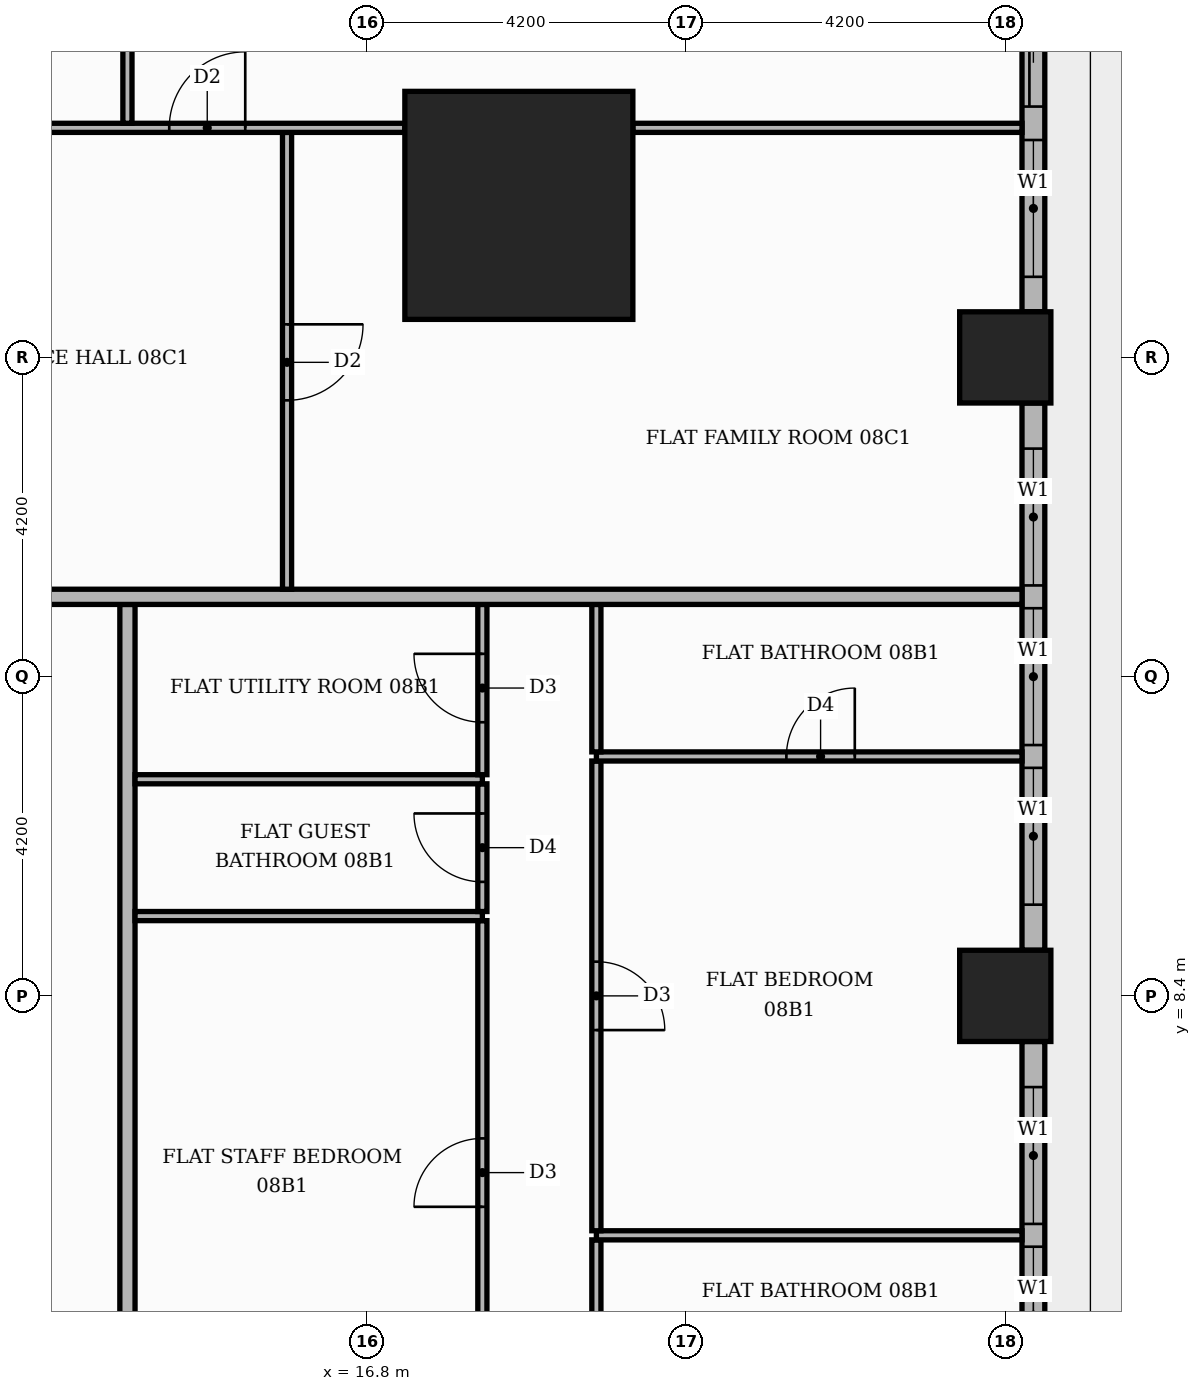
"""IFC4 building model, lengths in metres.
Left out: names, types, materials, properties, quantities, classifications, styles, units other than length and angle.
Written with IfcOpenShell. Run it as: python <this file> out.ifc"""

import sys

from ifc_helpers import new_model, si_unit, direction, frame, frame_2d, origin, origin_2d, place, context, subcontext, project, spatial, rectangle, extrude, element, fill, save


model = new_model("IFC4")
c1 = context("Model", 3, precision=1e-05, world=origin(), true_north=direction((0.0, 1.0)))
c2 = subcontext(c1, "Body", "Model", "MODEL_VIEW")
j1 = project(units=[si_unit("LENGTHUNIT", "METRE"), si_unit("PLANEANGLEUNIT", "RADIAN")], contexts=[c1])
p1 = place(None, origin())
s1 = spatial("IfcSite", under=j1, at=p1, CompositionType="ELEMENT")
p2 = place(p1, origin())
s2 = spatial("IfcBuilding", under=s1, at=p2, CompositionType="ELEMENT")
p3 = place(p2, frame((0.0, 0.0, 38.7)))
s3 = spatial("IfcBuildingStorey", under=s2, at=p3, CompositionType="ELEMENT", Elevation=38.7)
p4 = place(p3, frame((18.8, 18.8, 0.0), z_axis=(0.0, 0.0, 1.0), x_axis=(1.0, 0.0, 0.0)))
e1 = element("IfcColumn", 1, at=p4, inside=s3, PredefinedType="COLUMN", context=c2, shape_type="SweptSolid", body=[
    extrude(rectangle(XDim=3.0, YDim=3.0, at=origin_2d()), origin(), (0.0, 0.0, 1.0), 3.9),
])
for number, where, z_axis, x_axis in (
    (2, (25.2, 8.4, 0.0), (0.0, 0.0, 1.0), (1.0, 0.0, 0.0)),
    (3, (25.2, 16.8, 0.0), (0.0, 0.0, 1.0), (1.0, 0.0, 0.0)),
):
    element("IfcColumn", number, at=place(p3, frame(where, z_axis=z_axis, x_axis=x_axis)), inside=s3, PredefinedType="COLUMN", context=c2, shape_type="SweptSolid", body=[
        extrude(rectangle(XDim=1.2, YDim=1.2, at=origin_2d()), origin(), (0.0, 0.0, 1.0), 3.9),
    ])
p5 = place(p3, frame((25.57, 0.6, 0.0), z_axis=(0.0, 0.0, 1.0), x_axis=(0.0, 1.0, 0.0)))
e4 = element("IfcWall", 4, at=p5, inside=s3, PredefinedType="STANDARD", context=c2, shape_type="SweptSolid", body=[
    extrude(rectangle(XDim=7.2, YDim=0.3, at=frame_2d((3.6, 0.0))), origin(), (0.0, 0.0, 1.0), 3.48),
])
p6 = place(p5, frame((0.6, 0.0, 0.9)))
e5 = element("IfcOpeningElement", 5, at=p6, cuts=e4, PredefinedType="OPENING", context=c2, shape_type="SweptSolid", body=[
    extrude(rectangle(XDim=1.8, YDim=2.1, at=frame_2d((0.9, 1.05))), frame((0.0, 0.16, 0.0), z_axis=(0.0, -1.0, 0.0), x_axis=(1.0, 0.0, 0.0)), (0.0, 0.0, 1.0), 0.32),
])
p7 = place(p5, frame((2.7, 0.0, 0.9)))
e6 = element("IfcOpeningElement", 6, at=p7, cuts=e4, PredefinedType="OPENING", context=c2, shape_type="SweptSolid", body=[
    extrude(rectangle(XDim=1.8, YDim=2.1, at=frame_2d((0.9, 1.05))), frame((0.0, 0.16, 0.0), z_axis=(0.0, -1.0, 0.0), x_axis=(1.0, 0.0, 0.0)), (0.0, 0.0, 1.0), 0.32),
])
p8 = place(p5, frame((4.8, 0.0, 0.9)))
e7 = element("IfcOpeningElement", 7, at=p8, cuts=e4, PredefinedType="OPENING", context=c2, shape_type="SweptSolid", body=[
    extrude(rectangle(XDim=1.8, YDim=2.1, at=frame_2d((0.9, 1.05))), frame((0.0, 0.16, 0.0), z_axis=(0.0, -1.0, 0.0), x_axis=(1.0, 0.0, 0.0)), (0.0, 0.0, 1.0), 0.32),
])
p9 = place(p3, frame((25.57, 9.0, 0.0), z_axis=(0.0, 0.0, 1.0), x_axis=(0.0, 1.0, 0.0)))
e8 = element("IfcWall", 8, at=p9, inside=s3, PredefinedType="STANDARD", context=c2, shape_type="SweptSolid", body=[
    extrude(rectangle(XDim=7.2, YDim=0.3, at=frame_2d((3.6, 0.0))), origin(), (0.0, 0.0, 1.0), 3.48),
])
p10 = place(p9, frame((0.6, 0.0, 0.9)))
e9 = element("IfcOpeningElement", 9, at=p10, cuts=e8, PredefinedType="OPENING", context=c2, shape_type="SweptSolid", body=[
    extrude(rectangle(XDim=1.8, YDim=2.1, at=frame_2d((0.9, 1.05))), frame((0.0, 0.16, 0.0), z_axis=(0.0, -1.0, 0.0), x_axis=(1.0, 0.0, 0.0)), (0.0, 0.0, 1.0), 0.32),
])
p11 = place(p9, frame((2.7, 0.0, 0.9)))
e10 = element("IfcOpeningElement", 10, at=p11, cuts=e8, PredefinedType="OPENING", context=c2, shape_type="SweptSolid", body=[
    extrude(rectangle(XDim=1.8, YDim=2.1, at=frame_2d((0.9, 1.05))), frame((0.0, 0.16, 0.0), z_axis=(0.0, -1.0, 0.0), x_axis=(1.0, 0.0, 0.0)), (0.0, 0.0, 1.0), 0.32),
])
p12 = place(p9, frame((4.8, 0.0, 0.9)))
e11 = element("IfcOpeningElement", 11, at=p12, cuts=e8, PredefinedType="OPENING", context=c2, shape_type="SweptSolid", body=[
    extrude(rectangle(XDim=1.8, YDim=2.1, at=frame_2d((0.9, 1.05))), frame((0.0, 0.16, 0.0), z_axis=(0.0, -1.0, 0.0), x_axis=(1.0, 0.0, 0.0)), (0.0, 0.0, 1.0), 0.32),
])
p13 = place(p3, frame((25.57, 17.4, 0.0), z_axis=(0.0, 0.0, 1.0), x_axis=(0.0, 1.0, 0.0)))
e12 = element("IfcWall", 12, at=p13, inside=s3, PredefinedType="STANDARD", context=c2, shape_type="SweptSolid", body=[
    extrude(rectangle(XDim=5.32, YDim=0.3, at=frame_2d((2.66, 0.0))), origin(), (0.0, 0.0, 1.0), 3.48),
])
p14 = place(p13, frame((2.7, 0.0, 0.0)))
e13 = element("IfcOpeningElement", 13, at=p14, cuts=e12, PredefinedType="OPENING", context=c2, shape_type="SweptSolid", body=[
    extrude(rectangle(XDim=1.8, YDim=2.4, at=frame_2d((0.9, 1.2))), frame((0.0, 0.16, 0.0), z_axis=(0.0, -1.0, 0.0), x_axis=(1.0, 0.0, 0.0)), (0.0, 0.0, 1.0), 0.32),
])
p15 = place(p13, frame((0.46, 0.0, 0.9)))
e14 = element("IfcOpeningElement", 14, at=p15, cuts=e12, PredefinedType="OPENING", context=c2, shape_type="SweptSolid", body=[
    extrude(rectangle(XDim=1.8, YDim=2.1, at=frame_2d((0.9, 1.05))), frame((0.0, 0.16, 0.0), z_axis=(0.0, -1.0, 0.0), x_axis=(1.0, 0.0, 0.0)), (0.0, 0.0, 1.0), 0.32),
])
p16 = place(p3, frame((13.65, -13.55, 0.0), z_axis=(0.0, 0.0, 1.0), x_axis=(0.0, 1.0, 0.0)))
e15 = element("IfcWall", 15, at=p16, inside=s3, PredefinedType="PARTITIONING", context=c2, shape_type="SweptSolid", body=[
    extrude(rectangle(XDim=27.1, YDim=0.2, at=frame_2d((13.55, 0.0))), origin(), (0.0, 0.0, 1.0), 3.48),
])
p17 = place(p16, frame((2.5, 0.0, 0.0)))
e16 = element("IfcOpeningElement", 16, at=p17, cuts=e15, PredefinedType="OPENING", context=c2, shape_type="SweptSolid", body=[
    extrude(rectangle(XDim=1.1, YDim=2.4, at=frame_2d((0.55, 1.2))), frame((0.0, 0.11, 0.0), z_axis=(0.0, -1.0, 0.0), x_axis=(1.0, 0.0, 0.0)), (0.0, 0.0, 1.0), 0.22),
])
p18 = place(p3, frame((18.32, 2.76, 0.0), z_axis=(0.0, 0.0, 1.0), x_axis=(0.0, 1.0, 0.0)))
e17 = element("IfcWall", 17, at=p18, inside=s3, PredefinedType="PARTITIONING", context=c2, shape_type="SweptSolid", body=[
    extrude(rectangle(XDim=6.63, YDim=0.12, at=frame_2d((3.315, 0.0))), origin(), (0.0, 0.0, 1.0), 3.48),
])
p19 = place(p18, frame((2.865, 0.0, 0.0)))
e18 = element("IfcOpeningElement", 18, at=p19, cuts=e17, PredefinedType="OPENING", context=c2, shape_type="SweptSolid", body=[
    extrude(rectangle(XDim=0.9, YDim=2.1, at=frame_2d((0.45, 1.05))), frame((0.0, 0.07, 0.0), z_axis=(0.0, -1.0, 0.0), x_axis=(1.0, 0.0, 0.0)), (0.0, 0.0, 1.0), 0.14),
])
p20 = place(p3, frame((19.82, 3.21, 0.0), z_axis=(0.0, 0.0, 1.0), x_axis=(0.0, 1.0, 0.0)))
e19 = element("IfcWall", 19, at=p20, inside=s3, PredefinedType="PARTITIONING", context=c2, shape_type="SweptSolid", body=[
    extrude(rectangle(XDim=1.98, YDim=0.12, at=frame_2d((0.99, 0.0))), origin(), (0.0, 0.0, 1.0), 3.48),
])
p21 = place(p3, frame((19.82, 5.25, 0.0), z_axis=(0.0, 0.0, 1.0), x_axis=(1.0, 0.0, 0.0)))
e20 = element("IfcWall", 20, at=p21, inside=s3, PredefinedType="PARTITIONING", context=c2, shape_type="SweptSolid", body=[
    extrude(rectangle(XDim=5.6, YDim=0.12, at=frame_2d((2.8, 0.0))), origin(), (0.0, 0.0, 1.0), 3.48),
])
p22 = place(p3, frame((19.82, 5.31, 0.0), z_axis=(0.0, 0.0, 1.0), x_axis=(0.0, 1.0, 0.0)))
e21 = element("IfcWall", 21, at=p22, inside=s3, PredefinedType="PARTITIONING", context=c2, shape_type="SweptSolid", body=[
    extrude(rectangle(XDim=6.18, YDim=0.12, at=frame_2d((3.09, 0.0))), origin(), (0.0, 0.0, 1.0), 3.48),
])
p23 = place(p22, frame((2.64, 0.0, 0.0)))
e22 = element("IfcOpeningElement", 22, at=p23, cuts=e21, PredefinedType="OPENING", context=c2, shape_type="SweptSolid", body=[
    extrude(rectangle(XDim=0.9, YDim=2.1, at=frame_2d((0.45, 1.05))), frame((0.0, 0.07, 0.0), z_axis=(0.0, -1.0, 0.0), x_axis=(1.0, 0.0, 0.0)), (0.0, 0.0, 1.0), 0.14),
])
p24 = place(p3, frame((13.75, 9.45, 0.0), z_axis=(0.0, 0.0, 1.0), x_axis=(1.0, 0.0, 0.0)))
e23 = element("IfcWall", 23, at=p24, inside=s3, PredefinedType="PARTITIONING", context=c2, shape_type="SweptSolid", body=[
    extrude(rectangle(XDim=4.57, YDim=0.12, at=frame_2d((2.285, 0.0))), origin(), (0.0, 0.0, 1.0), 3.48),
])
p25 = place(p3, frame((18.32, 9.51, 0.0), z_axis=(0.0, 0.0, 1.0), x_axis=(0.0, 1.0, 0.0)))
e24 = element("IfcWall", 24, at=p25, inside=s3, PredefinedType="PARTITIONING", context=c2, shape_type="SweptSolid", body=[
    extrude(rectangle(XDim=1.68, YDim=0.12, at=frame_2d((0.84, 0.0))), origin(), (0.0, 0.0, 1.0), 3.48),
])
p26 = place(p25, frame((0.39, 0.0, 0.0)))
e25 = element("IfcOpeningElement", 25, at=p26, cuts=e24, PredefinedType="OPENING", context=c2, shape_type="SweptSolid", body=[
    extrude(rectangle(XDim=0.9, YDim=2.1, at=frame_2d((0.45, 1.05))), frame((0.0, 0.07, 0.0), z_axis=(0.0, -1.0, 0.0), x_axis=(1.0, 0.0, 0.0)), (0.0, 0.0, 1.0), 0.14),
])
p27 = place(p3, frame((13.75, 11.25, 0.0), z_axis=(0.0, 0.0, 1.0), x_axis=(1.0, 0.0, 0.0)))
e26 = element("IfcWall", 26, at=p27, inside=s3, PredefinedType="PARTITIONING", context=c2, shape_type="SweptSolid", body=[
    extrude(rectangle(XDim=4.57, YDim=0.12, at=frame_2d((2.285, 0.0))), origin(), (0.0, 0.0, 1.0), 3.48),
])
p28 = place(p3, frame((18.32, 11.31, 0.0), z_axis=(0.0, 0.0, 1.0), x_axis=(0.0, 1.0, 0.0)))
e27 = element("IfcWall", 27, at=p28, inside=s3, PredefinedType="PARTITIONING", context=c2, shape_type="SweptSolid", body=[
    extrude(rectangle(XDim=2.24, YDim=0.12, at=frame_2d((1.12, 0.0))), origin(), (0.0, 0.0, 1.0), 3.48),
])
p29 = place(p28, frame((0.69, 0.0, 0.0)))
e28 = element("IfcOpeningElement", 28, at=p29, cuts=e27, PredefinedType="OPENING", context=c2, shape_type="SweptSolid", body=[
    extrude(rectangle(XDim=0.9, YDim=2.1, at=frame_2d((0.45, 1.05))), frame((0.0, 0.07, 0.0), z_axis=(0.0, -1.0, 0.0), x_axis=(1.0, 0.0, 0.0)), (0.0, 0.0, 1.0), 0.14),
])
p30 = place(p3, frame((19.82, 11.55, 0.0), z_axis=(0.0, 0.0, 1.0), x_axis=(1.0, 0.0, 0.0)))
e29 = element("IfcWall", 29, at=p30, inside=s3, PredefinedType="PARTITIONING", context=c2, shape_type="SweptSolid", body=[
    extrude(rectangle(XDim=5.6, YDim=0.12, at=frame_2d((2.8, 0.0))), origin(), (0.0, 0.0, 1.0), 3.48),
])
p31 = place(p30, frame((2.5, 0.0, 0.0)))
e30 = element("IfcOpeningElement", 30, at=p31, cuts=e29, PredefinedType="OPENING", context=c2, shape_type="SweptSolid", body=[
    extrude(rectangle(XDim=0.9, YDim=2.1, at=frame_2d((0.45, 1.05))), frame((0.0, 0.07, 0.0), z_axis=(0.0, -1.0, 0.0), x_axis=(1.0, 0.0, 0.0)), (0.0, 0.0, 1.0), 0.14),
])
p32 = place(p3, frame((19.82, 11.61, 0.0), z_axis=(0.0, 0.0, 1.0), x_axis=(0.0, 1.0, 0.0)))
e31 = element("IfcWall", 31, at=p32, inside=s3, PredefinedType="PARTITIONING", context=c2, shape_type="SweptSolid", body=[
    extrude(rectangle(XDim=1.94, YDim=0.12, at=frame_2d((0.97, 0.0))), origin(), (0.0, 0.0, 1.0), 3.48),
])
p33 = place(p3, frame((-13.65, 13.65, 0.0), z_axis=(0.0, 0.0, 1.0), x_axis=(1.0, 0.0, 0.0)))
e32 = element("IfcWall", 32, at=p33, inside=s3, PredefinedType="PARTITIONING", context=c2, shape_type="SweptSolid", body=[
    extrude(rectangle(XDim=39.07, YDim=0.2, at=frame_2d((19.535, 0.0))), origin(), (0.0, 0.0, 1.0), 3.48),
])
p34 = place(p33, frame((24.65, 0.0, 0.0)))
e33 = element("IfcOpeningElement", 33, at=p34, cuts=e32, PredefinedType="OPENING", context=c2, shape_type="SweptSolid", body=[
    extrude(rectangle(XDim=1.1, YDim=2.4, at=frame_2d((0.55, 1.2))), frame((0.0, 0.11, 0.0), z_axis=(0.0, -1.0, 0.0), x_axis=(1.0, 0.0, 0.0)), (0.0, 0.0, 1.0), 0.22),
])
p35 = place(p33, frame((14.15, 0.0, 0.0)))
e34 = element("IfcOpeningElement", 34, at=p35, cuts=e32, PredefinedType="OPENING", context=c2, shape_type="SweptSolid", body=[
    extrude(rectangle(XDim=1.1, YDim=2.4, at=frame_2d((0.55, 1.2))), frame((0.0, 0.11, 0.0), z_axis=(0.0, -1.0, 0.0), x_axis=(1.0, 0.0, 0.0)), (0.0, 0.0, 1.0), 0.22),
])
p36 = place(p3, frame((15.75, 13.75, 0.0), z_axis=(0.0, 0.0, 1.0), x_axis=(0.0, 1.0, 0.0)))
e35 = element("IfcWall", 35, at=p36, inside=s3, PredefinedType="PARTITIONING", context=c2, shape_type="SweptSolid", body=[
    extrude(rectangle(XDim=6.01, YDim=0.12, at=frame_2d((3.005, 0.0))), origin(), (0.0, 0.0, 1.0), 3.48),
])
p37 = place(p36, frame((2.485, 0.0, 0.0)))
e36 = element("IfcOpeningElement", 36, at=p37, cuts=e35, PredefinedType="OPENING", context=c2, shape_type="SweptSolid", body=[
    extrude(rectangle(XDim=1.0, YDim=2.1, at=frame_2d((0.5, 1.05))), frame((0.0, 0.07, 0.0), z_axis=(0.0, -1.0, 0.0), x_axis=(1.0, 0.0, 0.0)), (0.0, 0.0, 1.0), 0.14),
])
p38 = place(p3, frame((5.35, 19.82, 0.0), z_axis=(0.0, 0.0, 1.0), x_axis=(1.0, 0.0, 0.0)))
e37 = element("IfcWall", 37, at=p38, inside=s3, PredefinedType="PARTITIONING", context=c2, shape_type="SweptSolid", body=[
    extrude(rectangle(XDim=11.95, YDim=0.12, at=frame_2d((5.975, 0.0))), origin(), (0.0, 0.0, 1.0), 3.48),
])
p39 = place(p38, frame((8.85, 0.0, 0.0)))
e38 = element("IfcOpeningElement", 38, at=p39, cuts=e37, PredefinedType="OPENING", context=c2, shape_type="SweptSolid", body=[
    extrude(rectangle(XDim=1.0, YDim=2.1, at=frame_2d((0.5, 1.05))), frame((0.0, 0.07, 0.0), z_axis=(0.0, -1.0, 0.0), x_axis=(1.0, 0.0, 0.0)), (0.0, 0.0, 1.0), 0.14),
])
p40 = place(p38, frame((5.75, 0.0, 0.0)))
e39 = element("IfcOpeningElement", 39, at=p40, cuts=e37, PredefinedType="OPENING", context=c2, shape_type="SweptSolid", body=[
    extrude(rectangle(XDim=0.9, YDim=2.1, at=frame_2d((0.45, 1.05))), frame((0.0, 0.07, 0.0), z_axis=(0.0, -1.0, 0.0), x_axis=(1.0, 0.0, 0.0)), (0.0, 0.0, 1.0), 0.14),
])
p41 = place(p3, frame((20.3, 19.82, 0.0), z_axis=(0.0, 0.0, 1.0), x_axis=(1.0, 0.0, 0.0)))
e40 = element("IfcWall", 40, at=p41, inside=s3, PredefinedType="PARTITIONING", context=c2, shape_type="SweptSolid", body=[
    extrude(rectangle(XDim=5.12, YDim=0.12, at=frame_2d((2.56, 0.0))), origin(), (0.0, 0.0, 1.0), 3.48),
])
p42 = place(p3, frame((13.65, 19.88, 0.0), z_axis=(0.0, 0.0, 1.0), x_axis=(0.0, 1.0, 0.0)))
e41 = element("IfcWall", 41, at=p42, inside=s3, PredefinedType="PARTITIONING", context=c2, shape_type="SweptSolid", body=[
    extrude(rectangle(XDim=5.54, YDim=0.12, at=frame_2d((2.77, 0.0))), origin(), (0.0, 0.0, 1.0), 3.48),
])
p43 = place(p7, origin())
e42 = element("IfcWindow", 42, at=p43, inside=s3, PartitioningType="SINGLE_PANEL", PredefinedType="WINDOW", context=c2, shape_type="SweptSolid", body=[
    extrude(rectangle(XDim=1.8, YDim=2.1, at=frame_2d((0.9, 1.05))), frame((0.0, 0.03, 0.0), z_axis=(0.0, -1.0, 0.0), x_axis=(1.0, 0.0, 0.0)), (0.0, 0.0, 1.0), 0.06),
])
fill(e6, e42)
p44 = place(p8, origin())
e43 = element("IfcWindow", 43, at=p44, inside=s3, PartitioningType="SINGLE_PANEL", PredefinedType="WINDOW", context=c2, shape_type="SweptSolid", body=[
    extrude(rectangle(XDim=1.8, YDim=2.1, at=frame_2d((0.9, 1.05))), frame((0.0, 0.03, 0.0), z_axis=(0.0, -1.0, 0.0), x_axis=(1.0, 0.0, 0.0)), (0.0, 0.0, 1.0), 0.06),
])
fill(e7, e43)
p45 = place(p10, origin())
e44 = element("IfcWindow", 44, at=p45, inside=s3, PartitioningType="SINGLE_PANEL", PredefinedType="WINDOW", context=c2, shape_type="SweptSolid", body=[
    extrude(rectangle(XDim=1.8, YDim=2.1, at=frame_2d((0.9, 1.05))), frame((0.0, 0.03, 0.0), z_axis=(0.0, -1.0, 0.0), x_axis=(1.0, 0.0, 0.0)), (0.0, 0.0, 1.0), 0.06),
])
fill(e9, e44)
p46 = place(p11, origin())
e45 = element("IfcWindow", 45, at=p46, inside=s3, PartitioningType="SINGLE_PANEL", PredefinedType="WINDOW", context=c2, shape_type="SweptSolid", body=[
    extrude(rectangle(XDim=1.8, YDim=2.1, at=frame_2d((0.9, 1.05))), frame((0.0, 0.03, 0.0), z_axis=(0.0, -1.0, 0.0), x_axis=(1.0, 0.0, 0.0)), (0.0, 0.0, 1.0), 0.06),
])
fill(e10, e45)
p47 = place(p12, origin())
e46 = element("IfcWindow", 46, at=p47, inside=s3, PartitioningType="SINGLE_PANEL", PredefinedType="WINDOW", context=c2, shape_type="SweptSolid", body=[
    extrude(rectangle(XDim=1.8, YDim=2.1, at=frame_2d((0.9, 1.05))), frame((0.0, 0.03, 0.0), z_axis=(0.0, -1.0, 0.0), x_axis=(1.0, 0.0, 0.0)), (0.0, 0.0, 1.0), 0.06),
])
fill(e11, e46)
p48 = place(p14, origin())
e47 = element("IfcDoor", 47, at=p48, inside=s3, OperationType="SLIDING_TO_LEFT", PredefinedType="DOOR", context=c2, shape_type="SweptSolid", body=[
    extrude(rectangle(XDim=1.8, YDim=2.4, at=frame_2d((0.9, 1.2))), frame((0.0, 0.025, 0.0), z_axis=(0.0, -1.0, 0.0), x_axis=(1.0, 0.0, 0.0)), (0.0, 0.0, 1.0), 0.05),
])
fill(e13, e47)
p49 = place(p15, origin())
e48 = element("IfcWindow", 48, at=p49, inside=s3, PartitioningType="SINGLE_PANEL", PredefinedType="WINDOW", context=c2, shape_type="SweptSolid", body=[
    extrude(rectangle(XDim=1.8, YDim=2.1, at=frame_2d((0.9, 1.05))), frame((0.0, 0.03, 0.0), z_axis=(0.0, -1.0, 0.0), x_axis=(1.0, 0.0, 0.0)), (0.0, 0.0, 1.0), 0.06),
])
fill(e14, e48)
p50 = place(p19, origin())
e49 = element("IfcDoor", 49, at=p50, inside=s3, OperationType="SINGLE_SWING_LEFT", PredefinedType="DOOR", context=c2, shape_type="SweptSolid", body=[
    extrude(rectangle(XDim=0.9, YDim=2.1, at=frame_2d((0.45, 1.05))), frame((0.0, 0.025, 0.0), z_axis=(0.0, -1.0, 0.0), x_axis=(1.0, 0.0, 0.0)), (0.0, 0.0, 1.0), 0.05),
])
fill(e18, e49)
p51 = place(p26, origin())
e50 = element("IfcDoor", 50, at=p51, inside=s3, OperationType="SINGLE_SWING_RIGHT", PredefinedType="DOOR", context=c2, shape_type="SweptSolid", body=[
    extrude(rectangle(XDim=0.9, YDim=2.1, at=frame_2d((0.45, 1.05))), frame((0.0, 0.025, 0.0), z_axis=(0.0, -1.0, 0.0), x_axis=(1.0, 0.0, 0.0)), (0.0, 0.0, 1.0), 0.05),
])
fill(e25, e50)
p52 = place(p29, origin())
e51 = element("IfcDoor", 51, at=p52, inside=s3, OperationType="SINGLE_SWING_RIGHT", PredefinedType="DOOR", context=c2, shape_type="SweptSolid", body=[
    extrude(rectangle(XDim=0.9, YDim=2.1, at=frame_2d((0.45, 1.05))), frame((0.0, 0.025, 0.0), z_axis=(0.0, -1.0, 0.0), x_axis=(1.0, 0.0, 0.0)), (0.0, 0.0, 1.0), 0.05),
])
fill(e28, e51)
p53 = place(p23, frame((0.9, 0.0, 0.0), z_axis=(0.0, 0.0, 1.0), x_axis=(-1.0, 0.0, 0.0)))
e52 = element("IfcDoor", 52, at=p53, inside=s3, OperationType="SINGLE_SWING_LEFT", PredefinedType="DOOR", context=c2, shape_type="SweptSolid", body=[
    extrude(rectangle(XDim=0.9, YDim=2.1, at=frame_2d((0.45, 1.05))), frame((0.0, 0.025, 0.0), z_axis=(0.0, -1.0, 0.0), x_axis=(1.0, 0.0, 0.0)), (0.0, 0.0, 1.0), 0.05),
])
fill(e22, e52)
p54 = place(p31, origin())
e53 = element("IfcDoor", 53, at=p54, inside=s3, OperationType="SINGLE_SWING_RIGHT", PredefinedType="DOOR", context=c2, shape_type="SweptSolid", body=[
    extrude(rectangle(XDim=0.9, YDim=2.1, at=frame_2d((0.45, 1.05))), frame((0.0, 0.025, 0.0), z_axis=(0.0, -1.0, 0.0), x_axis=(1.0, 0.0, 0.0)), (0.0, 0.0, 1.0), 0.05),
])
fill(e30, e53)
p55 = place(p37, frame((1.0, 0.0, 0.0), z_axis=(0.0, 0.0, 1.0), x_axis=(-1.0, 0.0, 0.0)))
e54 = element("IfcDoor", 54, at=p55, inside=s3, OperationType="SINGLE_SWING_RIGHT", PredefinedType="DOOR", context=c2, shape_type="SweptSolid", body=[
    extrude(rectangle(XDim=1.0, YDim=2.1, at=frame_2d((0.5, 1.05))), frame((0.0, 0.025, 0.0), z_axis=(0.0, -1.0, 0.0), x_axis=(1.0, 0.0, 0.0)), (0.0, 0.0, 1.0), 0.05),
])
fill(e36, e54)
p56 = place(p39, origin())
e55 = element("IfcDoor", 55, at=p56, inside=s3, OperationType="SINGLE_SWING_RIGHT", PredefinedType="DOOR", context=c2, shape_type="SweptSolid", body=[
    extrude(rectangle(XDim=1.0, YDim=2.1, at=frame_2d((0.5, 1.05))), frame((0.0, 0.025, 0.0), z_axis=(0.0, -1.0, 0.0), x_axis=(1.0, 0.0, 0.0)), (0.0, 0.0, 1.0), 0.05),
])
fill(e38, e55)
save(model, sys.argv[1])
